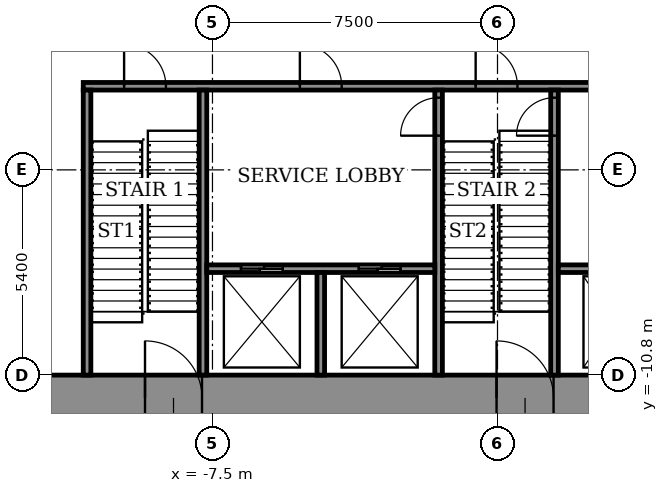
"""IFC4 building model, lengths in metres.
Left out: names, types, materials, properties, quantities, classifications, styles, units other than length and angle.
Written with IfcOpenShell. Run it as: python <this file> out.ifc"""

import sys

from ifc_helpers import new_model, si_unit, direction, frame, frame_2d, origin, place, context, subcontext, project, spatial, rectangle, extrude, element, fill, save


model = new_model("IFC4")
c1 = context("Model", 3, precision=1e-05, world=origin(), true_north=direction((0.0, 1.0)))
c2 = subcontext(c1, "Body", "Model", "MODEL_VIEW")
j1 = project(units=[si_unit("LENGTHUNIT", "METRE"), si_unit("PLANEANGLEUNIT", "RADIAN")], contexts=[c1])
p1 = place(None, origin())
s1 = spatial("IfcSite", under=j1, at=p1, CompositionType="ELEMENT")
p2 = place(p1, origin())
s2 = spatial("IfcBuilding", under=s1, at=p2, CompositionType="ELEMENT")
p3 = place(p2, origin())
s3 = spatial("IfcBuildingStorey", under=s2, at=p3, CompositionType="ELEMENT", Elevation=0.0)
p4 = place(p3, frame((-15.0, -11.4, 0.0), z_axis=(0.0, 0.0, 1.0), x_axis=(1.0, 0.0, 0.0)))
e1 = element("IfcWall", 1, at=p4, inside=s3, PredefinedType="SHEAR", context=c2, shape_type="SweptSolid", body=[
    extrude(rectangle(XDim=30.0, YDim=1.2, at=frame_2d((15.0, 0.0))), origin(), (0.0, 0.0, 1.0), 6.0),
])
p5 = place(p4, frame((5.725, 0.0, 0.0)))
e2 = element("IfcOpeningElement", 2, at=p5, cuts=e1, PredefinedType="OPENING", context=c2, shape_type="SweptSolid", body=[
    extrude(rectangle(XDim=1.5, YDim=2.1, at=frame_2d((0.75, 1.05))), frame((0.0, 0.61, 0.0), z_axis=(0.0, -1.0, 0.0), x_axis=(1.0, 0.0, 0.0)), (0.0, 0.0, 1.0), 1.22),
])
p6 = place(p4, frame((14.975, 0.0, 0.0)))
e3 = element("IfcOpeningElement", 3, at=p6, cuts=e1, PredefinedType="OPENING", context=c2, shape_type="SweptSolid", body=[
    extrude(rectangle(XDim=1.5, YDim=2.1, at=frame_2d((0.75, 1.05))), frame((0.0, 0.61, 0.0), z_axis=(0.0, -1.0, 0.0), x_axis=(1.0, 0.0, 0.0)), (0.0, 0.0, 1.0), 1.22),
])
p7 = place(p4, frame((24.275, 0.0, 0.0)))
e4 = element("IfcOpeningElement", 4, at=p7, cuts=e1, PredefinedType="OPENING", context=c2, shape_type="SweptSolid", body=[
    extrude(rectangle(XDim=1.5, YDim=2.1, at=frame_2d((0.75, 1.05))), frame((0.0, 0.61, 0.0), z_axis=(0.0, -1.0, 0.0), x_axis=(1.0, 0.0, 0.0)), (0.0, 0.0, 1.0), 1.22),
])
p8 = place(p3, frame((-10.9, -3.2, 0.0), z_axis=(0.0, 0.0, 1.0), x_axis=(1.0, 0.0, 0.0)))
e5 = element("IfcWall", 5, at=p8, inside=s3, PredefinedType="SHEAR", context=c2, shape_type="SweptSolid", body=[
    extrude(rectangle(XDim=21.8, YDim=0.2, at=frame_2d((10.9, 0.0))), origin(), (0.0, 0.0, 1.0), 5.45),
])
p9 = place(p8, frame((1.075, 0.0, 0.0)))
e6 = element("IfcOpeningElement", 6, at=p9, cuts=e5, PredefinedType="OPENING", context=c2, shape_type="SweptSolid", body=[
    extrude(rectangle(XDim=1.1, YDim=2.1, at=frame_2d((0.55, 1.05))), frame((0.0, 0.11, 0.0), z_axis=(0.0, -1.0, 0.0), x_axis=(1.0, 0.0, 0.0)), (0.0, 0.0, 1.0), 0.22),
])
p10 = place(p8, frame((10.325, 0.0, 0.0)))
e7 = element("IfcOpeningElement", 7, at=p10, cuts=e5, PredefinedType="OPENING", context=c2, shape_type="SweptSolid", body=[
    extrude(rectangle(XDim=1.1, YDim=2.1, at=frame_2d((0.55, 1.05))), frame((0.0, 0.11, 0.0), z_axis=(0.0, -1.0, 0.0), x_axis=(1.0, 0.0, 0.0)), (0.0, 0.0, 1.0), 0.22),
])
p11 = place(p8, frame((19.625, 0.0, 0.0)))
e8 = element("IfcOpeningElement", 8, at=p11, cuts=e5, PredefinedType="OPENING", context=c2, shape_type="SweptSolid", body=[
    extrude(rectangle(XDim=1.1, YDim=2.1, at=frame_2d((0.55, 1.05))), frame((0.0, 0.11, 0.0), z_axis=(0.0, -1.0, 0.0), x_axis=(1.0, 0.0, 0.0)), (0.0, 0.0, 1.0), 0.22),
])
p12 = place(p8, frame((5.7, 0.0, 0.0)))
e9 = element("IfcOpeningElement", 9, at=p12, cuts=e5, PredefinedType="OPENING", context=c2, shape_type="SweptSolid", body=[
    extrude(rectangle(XDim=1.1, YDim=2.1, at=frame_2d((0.55, 1.05))), frame((0.0, 0.11, 0.0), z_axis=(0.0, -1.0, 0.0), x_axis=(1.0, 0.0, 0.0)), (0.0, 0.0, 1.0), 0.22),
])
p13 = place(p8, frame((14.975, 0.0, 0.0)))
e10 = element("IfcOpeningElement", 10, at=p13, cuts=e5, PredefinedType="OPENING", context=c2, shape_type="SweptSolid", body=[
    extrude(rectangle(XDim=1.1, YDim=2.1, at=frame_2d((0.55, 1.05))), frame((0.0, 0.11, 0.0), z_axis=(0.0, -1.0, 0.0), x_axis=(1.0, 0.0, 0.0)), (0.0, 0.0, 1.0), 0.22),
])
for number, where, z_axis, x_axis in (
    (11, (-10.8, -10.8, 0.0), (0.0, 0.0, 1.0), (0.0, 1.0, 0.0)),
    (12, (-7.75, -10.8, 0.0), (0.0, 0.0, 1.0), (0.0, 1.0, 0.0)),
):
    element("IfcWall", number, at=place(p3, frame(where, z_axis=z_axis, x_axis=x_axis)), inside=s3, PredefinedType="SHEAR", context=c2, shape_type="SweptSolid", body=[
        extrude(rectangle(XDim=7.5, YDim=0.2, at=frame_2d((3.75, 0.0))), origin(), (0.0, 0.0, 1.0), 5.45),
    ])
p14 = place(p3, frame((-1.55, -10.8, 0.0), z_axis=(0.0, 0.0, 1.0), x_axis=(0.0, 1.0, 0.0)))
e13 = element("IfcWall", 13, at=p14, inside=s3, PredefinedType="SHEAR", context=c2, shape_type="SweptSolid", body=[
    extrude(rectangle(XDim=7.5, YDim=0.2, at=frame_2d((3.75, 0.0))), origin(), (0.0, 0.0, 1.0), 5.45),
])
p15 = place(p14, frame((6.3, 0.0, 0.0)))
e14 = element("IfcOpeningElement", 14, at=p15, cuts=e13, PredefinedType="OPENING", context=c2, shape_type="SweptSolid", body=[
    extrude(rectangle(XDim=1.0, YDim=2.1, at=frame_2d((0.5, 1.05))), frame((0.0, 0.11, 0.0), z_axis=(0.0, -1.0, 0.0), x_axis=(1.0, 0.0, 0.0)), (0.0, 0.0, 1.0), 0.22),
])
p16 = place(p3, frame((1.5, -10.8, 0.0), z_axis=(0.0, 0.0, 1.0), x_axis=(0.0, 1.0, 0.0)))
e15 = element("IfcWall", 15, at=p16, inside=s3, PredefinedType="SHEAR", context=c2, shape_type="SweptSolid", body=[
    extrude(rectangle(XDim=7.5, YDim=0.2, at=frame_2d((3.75, 0.0))), origin(), (0.0, 0.0, 1.0), 5.45),
])
p17 = place(p16, frame((6.3, 0.0, 0.0)))
e16 = element("IfcOpeningElement", 16, at=p17, cuts=e15, PredefinedType="OPENING", context=c2, shape_type="SweptSolid", body=[
    extrude(rectangle(XDim=1.0, YDim=2.1, at=frame_2d((0.5, 1.05))), frame((0.0, 0.11, 0.0), z_axis=(0.0, -1.0, 0.0), x_axis=(1.0, 0.0, 0.0)), (0.0, 0.0, 1.0), 0.22),
])
p18 = place(p3, frame((-7.65, -8.0, 0.0), z_axis=(0.0, 0.0, 1.0), x_axis=(1.0, 0.0, 0.0)))
e17 = element("IfcWall", 17, at=p18, inside=s3, PredefinedType="SHEAR", context=c2, shape_type="SweptSolid", body=[
    extrude(rectangle(XDim=6.0, YDim=0.2, at=frame_2d((3.0, 0.0))), origin(), (0.0, 0.0, 1.0), 5.45),
])
p19 = place(p18, frame((0.9, 0.0, 0.0)))
e18 = element("IfcOpeningElement", 18, at=p19, cuts=e17, PredefinedType="OPENING", context=c2, shape_type="SweptSolid", body=[
    extrude(rectangle(XDim=1.1, YDim=2.1, at=frame_2d((0.55, 1.05))), frame((0.0, 0.11, 0.0), z_axis=(0.0, -1.0, 0.0), x_axis=(1.0, 0.0, 0.0)), (0.0, 0.0, 1.0), 0.22),
])
p20 = place(p18, frame((4.0, 0.0, 0.0)))
e19 = element("IfcOpeningElement", 19, at=p20, cuts=e17, PredefinedType="OPENING", context=c2, shape_type="SweptSolid", body=[
    extrude(rectangle(XDim=1.1, YDim=2.1, at=frame_2d((0.55, 1.05))), frame((0.0, 0.11, 0.0), z_axis=(0.0, -1.0, 0.0), x_axis=(1.0, 0.0, 0.0)), (0.0, 0.0, 1.0), 0.22),
])
p21 = place(p3, frame((-4.65, -10.8, 0.0), z_axis=(0.0, 0.0, 1.0), x_axis=(0.0, 1.0, 0.0)))
e20 = element("IfcWall", 20, at=p21, inside=s3, PredefinedType="SHEAR", context=c2, shape_type="SweptSolid", body=[
    extrude(rectangle(XDim=2.7, YDim=0.2, at=frame_2d((1.35, 0.0))), origin(), (0.0, 0.0, 1.0), 5.45),
])
p22 = place(p3, frame((1.6, -8.0, 0.0), z_axis=(0.0, 0.0, 1.0), x_axis=(1.0, 0.0, 0.0)))
e21 = element("IfcWall", 21, at=p22, inside=s3, PredefinedType="SHEAR", context=c2, shape_type="SweptSolid", body=[
    extrude(rectangle(XDim=6.05, YDim=0.2, at=frame_2d((3.025, 0.0))), origin(), (0.0, 0.0, 1.0), 5.45),
])
p23 = place(p22, frame((0.913, 0.0, 0.0)))
e22 = element("IfcOpeningElement", 22, at=p23, cuts=e21, PredefinedType="OPENING", context=c2, shape_type="SweptSolid", body=[
    extrude(rectangle(XDim=1.1, YDim=2.1, at=frame_2d((0.55, 1.05))), frame((0.0, 0.11, 0.0), z_axis=(0.0, -1.0, 0.0), x_axis=(1.0, 0.0, 0.0)), (0.0, 0.0, 1.0), 0.22),
])
p24 = place(p22, frame((4.038, 0.0, 0.0)))
e23 = element("IfcOpeningElement", 23, at=p24, cuts=e21, PredefinedType="OPENING", context=c2, shape_type="SweptSolid", body=[
    extrude(rectangle(XDim=1.1, YDim=2.1, at=frame_2d((0.55, 1.05))), frame((0.0, 0.11, 0.0), z_axis=(0.0, -1.0, 0.0), x_axis=(1.0, 0.0, 0.0)), (0.0, 0.0, 1.0), 0.22),
])
p25 = place(p5, origin())
e24 = element("IfcDoor", 24, at=p25, inside=s3, OperationType="DOUBLE_DOOR_SINGLE_SWING", PredefinedType="DOOR", context=c2, shape_type="SweptSolid", body=[
    extrude(rectangle(XDim=1.5, YDim=2.1, at=frame_2d((0.75, 1.05))), frame((0.0, 0.025, 0.0), z_axis=(0.0, -1.0, 0.0), x_axis=(1.0, 0.0, 0.0)), (0.0, 0.0, 1.0), 0.05),
])
fill(e2, e24)
p26 = place(p6, origin())
e25 = element("IfcDoor", 25, at=p26, inside=s3, OperationType="DOUBLE_DOOR_SINGLE_SWING", PredefinedType="DOOR", context=c2, shape_type="SweptSolid", body=[
    extrude(rectangle(XDim=1.5, YDim=2.1, at=frame_2d((0.75, 1.05))), frame((0.0, 0.025, 0.0), z_axis=(0.0, -1.0, 0.0), x_axis=(1.0, 0.0, 0.0)), (0.0, 0.0, 1.0), 0.05),
])
fill(e3, e25)
p27 = place(p19, origin())
e26 = element("IfcDoor", 26, at=p27, inside=s3, OperationType="SLIDING_TO_LEFT", PredefinedType="DOOR", context=c2, shape_type="SweptSolid", body=[
    extrude(rectangle(XDim=1.1, YDim=2.1, at=frame_2d((0.55, 1.05))), frame((0.0, 0.025, 0.0), z_axis=(0.0, -1.0, 0.0), x_axis=(1.0, 0.0, 0.0)), (0.0, 0.0, 1.0), 0.05),
])
fill(e18, e26)
p28 = place(p20, origin())
e27 = element("IfcDoor", 27, at=p28, inside=s3, OperationType="SLIDING_TO_LEFT", PredefinedType="DOOR", context=c2, shape_type="SweptSolid", body=[
    extrude(rectangle(XDim=1.1, YDim=2.1, at=frame_2d((0.55, 1.05))), frame((0.0, 0.025, 0.0), z_axis=(0.0, -1.0, 0.0), x_axis=(1.0, 0.0, 0.0)), (0.0, 0.0, 1.0), 0.05),
])
fill(e19, e27)
p29 = place(p9, origin())
e28 = element("IfcDoor", 28, at=p29, inside=s3, OperationType="SINGLE_SWING_RIGHT", PredefinedType="DOOR", context=c2, shape_type="SweptSolid", body=[
    extrude(rectangle(XDim=1.1, YDim=2.1, at=frame_2d((0.55, 1.05))), frame((0.0, 0.025, 0.0), z_axis=(0.0, -1.0, 0.0), x_axis=(1.0, 0.0, 0.0)), (0.0, 0.0, 1.0), 0.05),
])
fill(e6, e28)
p30 = place(p10, origin())
e29 = element("IfcDoor", 29, at=p30, inside=s3, OperationType="SINGLE_SWING_RIGHT", PredefinedType="DOOR", context=c2, shape_type="SweptSolid", body=[
    extrude(rectangle(XDim=1.1, YDim=2.1, at=frame_2d((0.55, 1.05))), frame((0.0, 0.025, 0.0), z_axis=(0.0, -1.0, 0.0), x_axis=(1.0, 0.0, 0.0)), (0.0, 0.0, 1.0), 0.05),
])
fill(e7, e29)
p31 = place(p12, origin())
e30 = element("IfcDoor", 30, at=p31, inside=s3, OperationType="SINGLE_SWING_LEFT", PredefinedType="DOOR", context=c2, shape_type="SweptSolid", body=[
    extrude(rectangle(XDim=1.1, YDim=2.1, at=frame_2d((0.55, 1.05))), frame((0.0, 0.025, 0.0), z_axis=(0.0, -1.0, 0.0), x_axis=(1.0, 0.0, 0.0)), (0.0, 0.0, 1.0), 0.05),
])
fill(e9, e30)
p32 = place(p15, origin())
e31 = element("IfcDoor", 31, at=p32, inside=s3, OperationType="SINGLE_SWING_RIGHT", PredefinedType="DOOR", context=c2, shape_type="SweptSolid", body=[
    extrude(rectangle(XDim=1.0, YDim=2.1, at=frame_2d((0.5, 1.05))), frame((0.0, 0.025, 0.0), z_axis=(0.0, -1.0, 0.0), x_axis=(1.0, 0.0, 0.0)), (0.0, 0.0, 1.0), 0.05),
])
fill(e14, e31)
p33 = place(p17, origin())
e32 = element("IfcDoor", 32, at=p33, inside=s3, OperationType="SINGLE_SWING_RIGHT", PredefinedType="DOOR", context=c2, shape_type="SweptSolid", body=[
    extrude(rectangle(XDim=1.0, YDim=2.1, at=frame_2d((0.5, 1.05))), frame((0.0, 0.025, 0.0), z_axis=(0.0, -1.0, 0.0), x_axis=(1.0, 0.0, 0.0)), (0.0, 0.0, 1.0), 0.05),
])
fill(e16, e32)
save(model, sys.argv[1])
